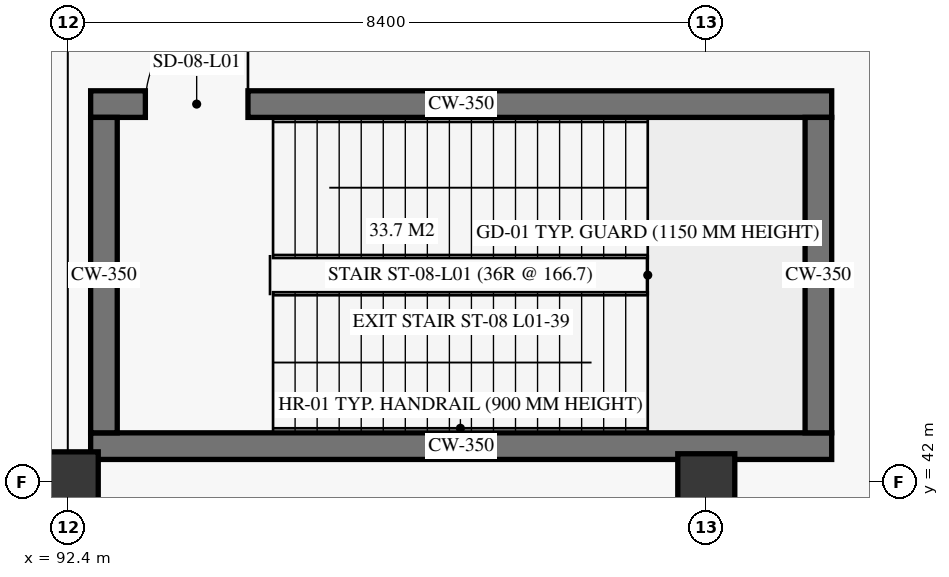
"""IFC4 building model, lengths in metres.
Left out: names, types, materials, properties, quantities, classifications, styles, units other than length and angle.
Written with IfcOpenShell. Run it as: python <this file> out.ifc"""

import sys

from ifc_helpers import new_model, si_unit, direction, frame, frame_2d, origin, origin_2d, place, context, subcontext, project, spatial, rectangle, extrude, element, fill, save


model = new_model("IFC4")
c1 = context("Model", 3, precision=1e-05, world=origin(), true_north=direction((0.0, 1.0)))
c2 = subcontext(c1, "Body", "Model", "MODEL_VIEW")
j1 = project(units=[si_unit("LENGTHUNIT", "METRE"), si_unit("PLANEANGLEUNIT", "RADIAN")], contexts=[c1])
p1 = place(None, origin())
s1 = spatial("IfcSite", under=j1, at=p1, CompositionType="ELEMENT")
p2 = place(p1, origin())
s2 = spatial("IfcBuilding", under=s1, at=p2, CompositionType="ELEMENT")
p3 = place(p2, origin())
s3 = spatial("IfcBuildingStorey", under=s2, at=p3, CompositionType="ELEMENT", Elevation=0.0)
p4 = place(p3, frame((92.4, 42.0, 0.0), z_axis=(0.0, 0.0, 1.0), x_axis=(1.0, 0.0, 0.0)))
e1 = element("IfcColumn", 1, at=p4, inside=s3, PredefinedType="COLUMN", context=c2, shape_type="SweptSolid", body=[
    extrude(rectangle(XDim=0.8, YDim=0.8, at=origin_2d()), origin(), (0.0, 0.0, 1.0), 5.7),
])
p5 = place(p3, frame((100.8, 42.0, 0.0), z_axis=(0.0, 0.0, 1.0), x_axis=(1.0, 0.0, 0.0)))
e2 = element("IfcColumn", 2, at=p5, inside=s3, PredefinedType="COLUMN", context=c2, shape_type="SweptSolid", body=[
    extrude(rectangle(XDim=0.75, YDim=0.75, at=origin_2d()), origin(), (0.0, 0.0, 1.0), 5.7),
])
p6 = place(p3, frame((92.7, 42.475, 0.0), z_axis=(0.0, 0.0, 1.0), x_axis=(1.0, 0.0, 0.0)))
e3 = element("IfcWall", 3, at=p6, inside=s3, PredefinedType="SHEAR", context=c2, shape_type="SweptSolid", body=[
    extrude(rectangle(XDim=9.75, YDim=0.35, at=frame_2d((4.875, 0.0))), origin(), (0.0, 0.0, 1.0), 5.7),
])
p7 = place(p3, frame((92.7, 46.975, 0.0), z_axis=(0.0, 0.0, 1.0), x_axis=(1.0, 0.0, 0.0)))
e4 = element("IfcWall", 4, at=p7, inside=s3, PredefinedType="SHEAR", context=c2, shape_type="SweptSolid", body=[
    extrude(rectangle(XDim=9.75, YDim=0.35, at=frame_2d((4.875, 0.0))), origin(), (0.0, 0.0, 1.0), 5.7),
])
p8 = place(p7, frame((0.72, 0.0, 0.0)))
e5 = element("IfcOpeningElement", 5, at=p8, cuts=e4, PredefinedType="OPENING", context=c2, shape_type="SweptSolid", body=[
    extrude(rectangle(XDim=1.35, YDim=2.25, at=frame_2d((0.675, 1.125))), frame((0.0, 0.185, 0.0), z_axis=(0.0, -1.0, 0.0), x_axis=(1.0, 0.0, 0.0)), (0.0, 0.0, 1.0), 0.37),
])
for number, where, z_axis, x_axis in (
    (6, (92.875, 42.65, 0.0), (0.0, 0.0, 1.0), (0.0, 1.0, 0.0)),
    (7, (102.275, 42.65, 0.0), (0.0, 0.0, 1.0), (0.0, 1.0, 0.0)),
):
    element("IfcWall", number, at=place(p3, frame(where, z_axis=z_axis, x_axis=x_axis)), inside=s3, PredefinedType="SHEAR", context=c2, shape_type="SweptSolid", body=[
        extrude(rectangle(XDim=4.15, YDim=0.35, at=frame_2d((2.075, 0.0))), origin(), (0.0, 0.0, 1.0), 5.7),
    ])
p9 = place(p8, origin())
e8 = element("IfcDoor", 8, at=p9, inside=s3, OperationType="SINGLE_SWING_RIGHT", PredefinedType="DOOR", context=c2, shape_type="SweptSolid", body=[
    extrude(rectangle(XDim=1.35, YDim=2.25, at=frame_2d((0.675, 1.125))), frame((0.0, 0.025, 0.0), z_axis=(0.0, -1.0, 0.0), x_axis=(1.0, 0.0, 0.0)), (0.0, 0.0, 1.0), 0.05),
])
fill(e5, e8)
save(model, sys.argv[1])
